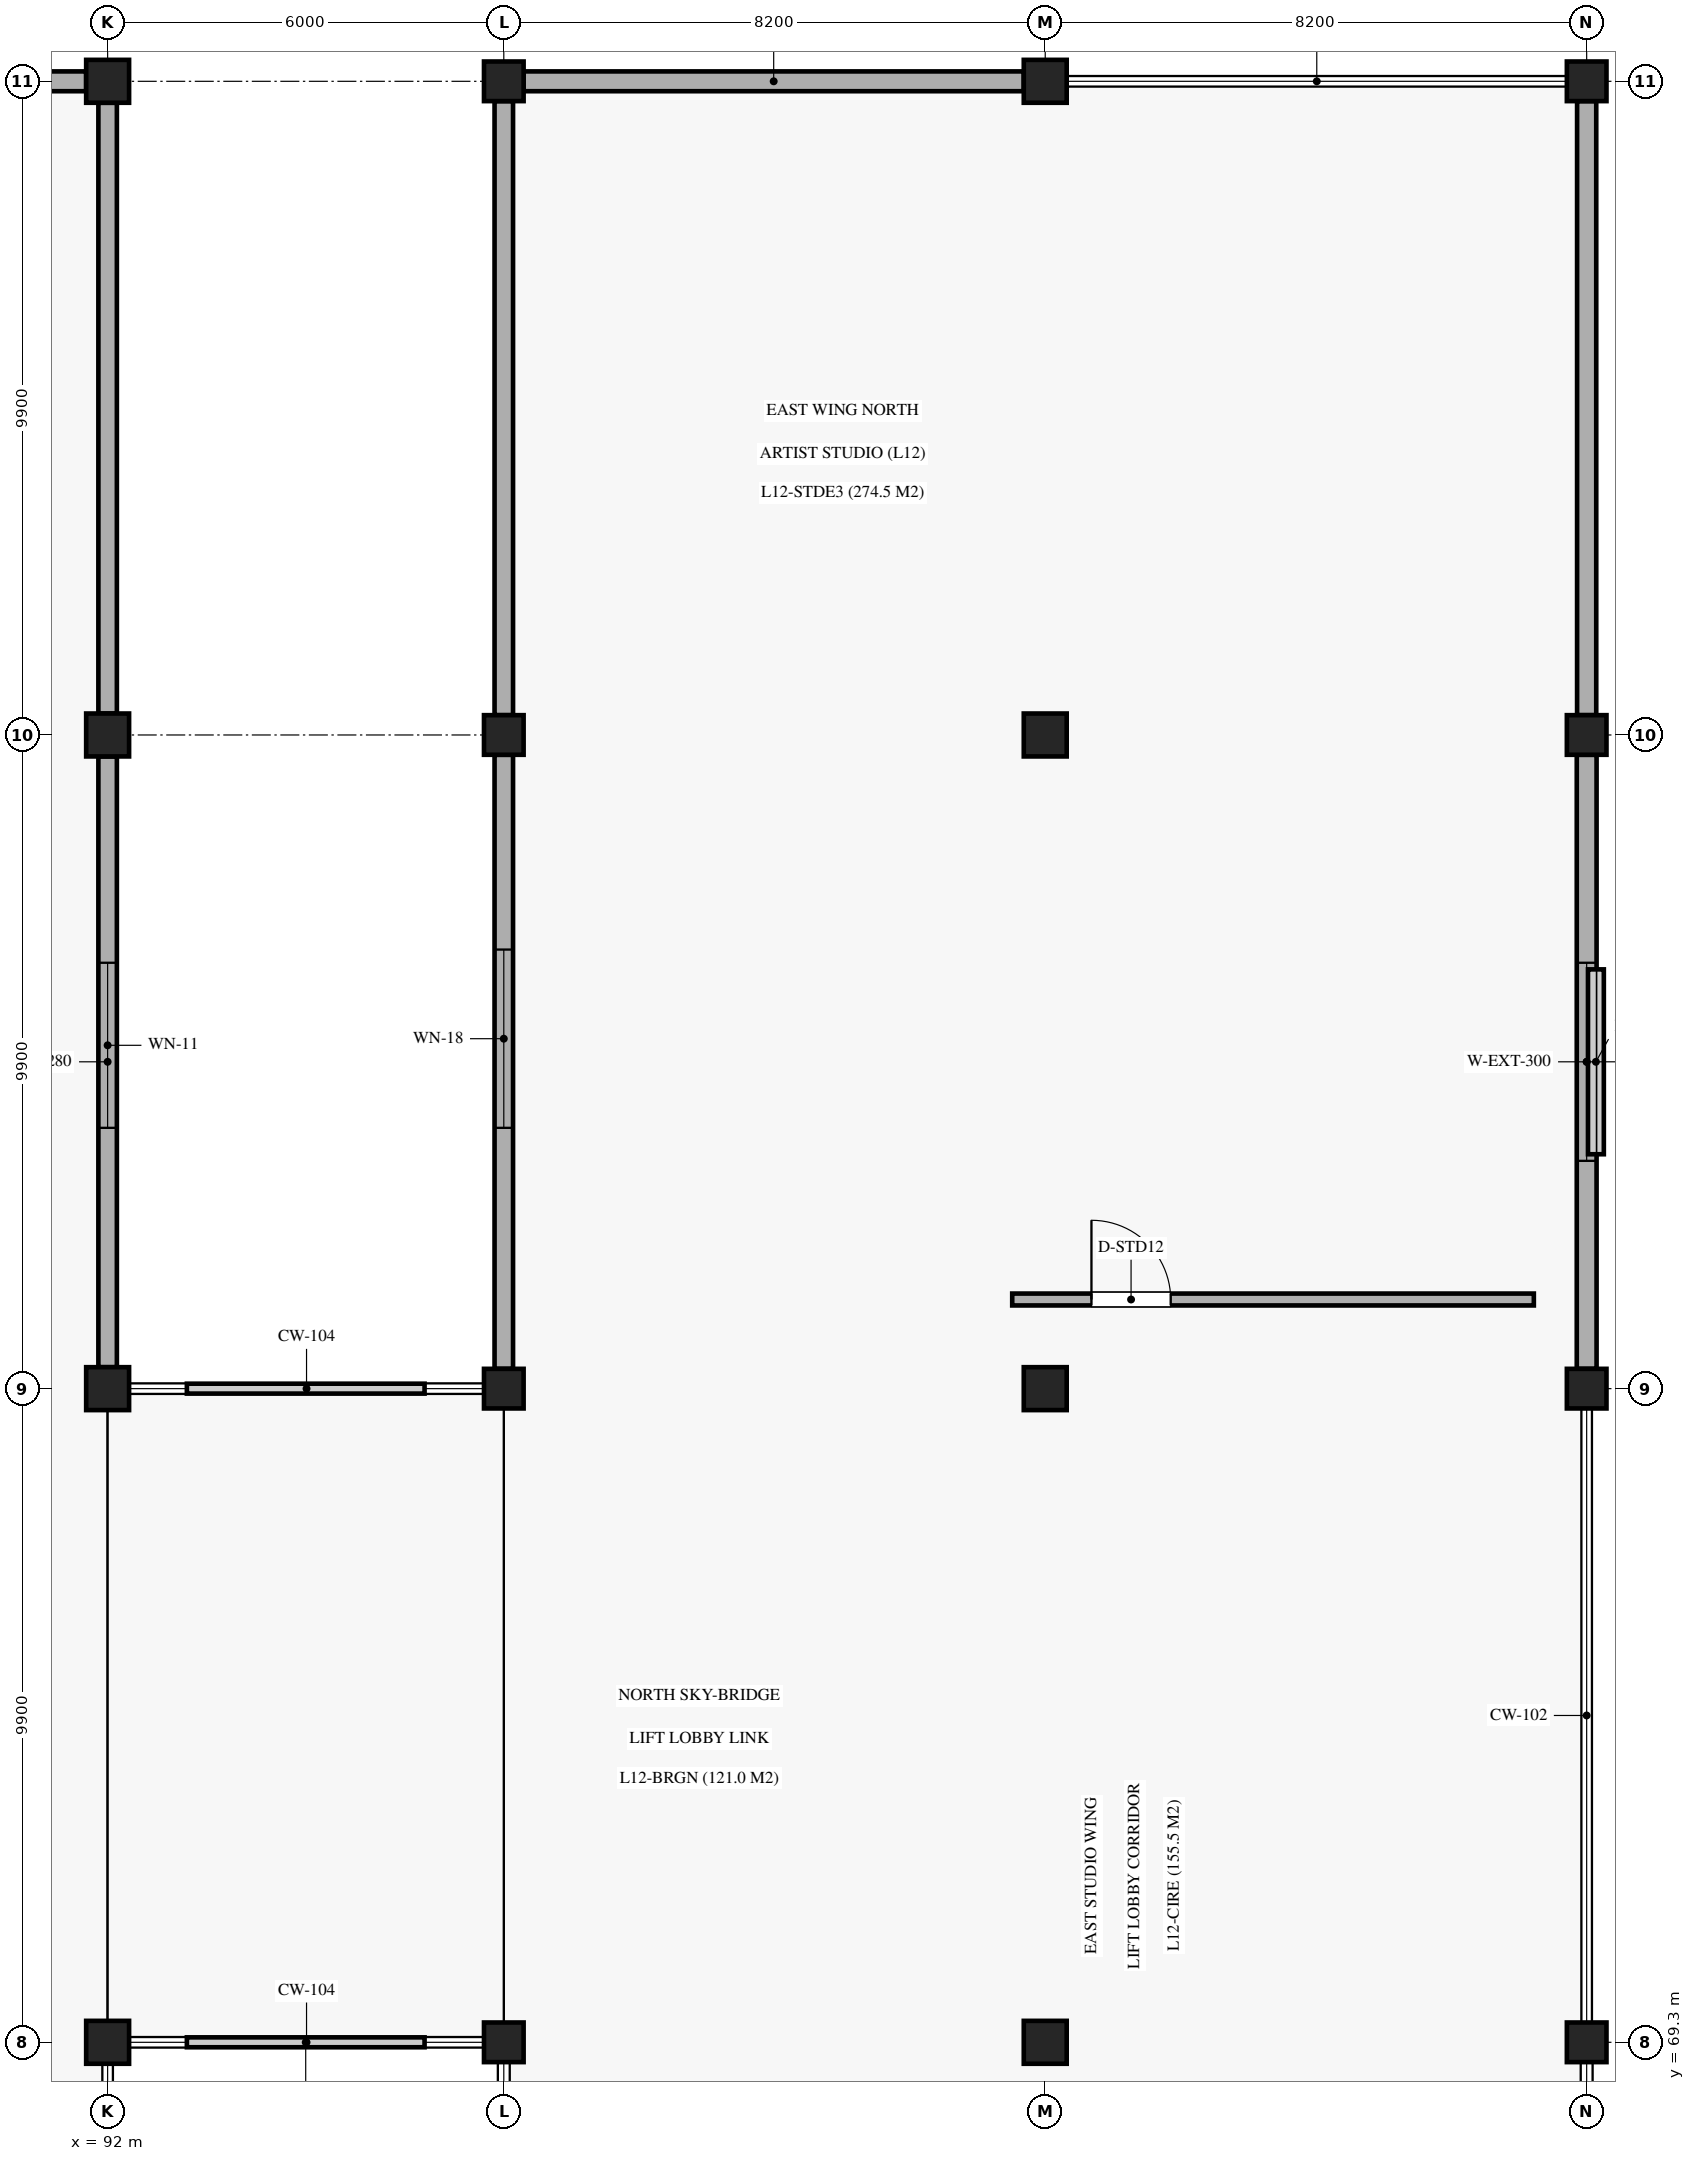
"""IFC4 building model, lengths in metres.
Left out: names, types, materials, properties, quantities, classifications, styles, units other than length and angle.
Written with IfcOpenShell. Run it as: python <this file> out.ifc"""

import sys

from ifc_helpers import new_model, si_unit, direction, frame, frame_2d, origin, origin_2d, place, context, subcontext, project, spatial, rectangle, extrude, element, fill, save


model = new_model("IFC4")
c1 = context("Model", 3, precision=1e-05, world=origin(), true_north=direction((0.0, 1.0)))
c2 = subcontext(c1, "Body", "Model", "MODEL_VIEW")
j1 = project(units=[si_unit("LENGTHUNIT", "METRE"), si_unit("PLANEANGLEUNIT", "RADIAN")], contexts=[c1])
p1 = place(None, origin())
s1 = spatial("IfcSite", under=j1, at=p1, CompositionType="ELEMENT")
p2 = place(p1, origin())
s2 = spatial("IfcBuilding", under=s1, at=p2, CompositionType="ELEMENT")
p3 = place(p2, frame((0.0, 0.0, 62.22)))
s3 = spatial("IfcBuildingStorey", under=s2, at=p3, CompositionType="ELEMENT", Elevation=62.22)
for number, where, z_axis, x_axis in (
    (1, (92.0, 69.3, 0.0), (0.0, 0.0, 1.0), (1.0, 0.0, 0.0)),
    (2, (92.0, 79.2, 0.0), (0.0, 0.0, 1.0), (1.0, 0.0, 0.0)),
    (3, (92.0, 89.1, 0.0), (0.0, 0.0, 1.0), (1.0, 0.0, 0.0)),
    (4, (92.0, 99.0, 0.0), (0.0, 0.0, 1.0), (1.0, 0.0, 0.0)),
):
    element("IfcColumn", number, at=place(p3, frame(where, z_axis=z_axis, x_axis=x_axis)), inside=s3, PredefinedType="COLUMN", context=c2, shape_type="SweptSolid", body=[
        extrude(rectangle(XDim=0.65, YDim=0.65, at=origin_2d()), origin(), (0.0, 0.0, 1.0), 4.08),
    ])
for number, where, z_axis, x_axis in (
    (5, (98.0, 69.3, 0.0), (0.0, 0.0, 1.0), (1.0, 0.0, 0.0)),
    (6, (98.0, 79.2, 0.0), (0.0, 0.0, 1.0), (1.0, 0.0, 0.0)),
    (7, (98.0, 89.1, 0.0), (0.0, 0.0, 1.0), (1.0, 0.0, 0.0)),
    (8, (98.0, 99.0, 0.0), (0.0, 0.0, 1.0), (1.0, 0.0, 0.0)),
):
    element("IfcColumn", number, at=place(p3, frame(where, z_axis=z_axis, x_axis=x_axis)), inside=s3, PredefinedType="COLUMN", context=c2, shape_type="SweptSolid", body=[
        extrude(rectangle(XDim=0.6, YDim=0.6, at=origin_2d()), origin(), (0.0, 0.0, 1.0), 4.08),
    ])
for number, where, z_axis, x_axis in (
    (9, (106.2, 69.3, 0.0), (0.0, 0.0, 1.0), (1.0, 0.0, 0.0)),
    (10, (106.2, 79.2, 0.0), (0.0, 0.0, 1.0), (1.0, 0.0, 0.0)),
    (11, (106.2, 89.1, 0.0), (0.0, 0.0, 1.0), (1.0, 0.0, 0.0)),
    (12, (106.2, 99.0, 0.0), (0.0, 0.0, 1.0), (1.0, 0.0, 0.0)),
):
    element("IfcColumn", number, at=place(p3, frame(where, z_axis=z_axis, x_axis=x_axis)), inside=s3, PredefinedType="COLUMN", context=c2, shape_type="SweptSolid", body=[
        extrude(rectangle(XDim=0.65, YDim=0.65, at=origin_2d()), origin(), (0.0, 0.0, 1.0), 4.08),
    ])
for number, where, z_axis, x_axis in (
    (13, (114.4, 69.3, 0.0), (0.0, 0.0, 1.0), (1.0, 0.0, 0.0)),
    (14, (114.4, 79.2, 0.0), (0.0, 0.0, 1.0), (1.0, 0.0, 0.0)),
    (15, (114.4, 89.1, 0.0), (0.0, 0.0, 1.0), (1.0, 0.0, 0.0)),
    (16, (114.4, 99.0, 0.0), (0.0, 0.0, 1.0), (1.0, 0.0, 0.0)),
):
    element("IfcColumn", number, at=place(p3, frame(where, z_axis=z_axis, x_axis=x_axis)), inside=s3, PredefinedType="COLUMN", context=c2, shape_type="SweptSolid", body=[
        extrude(rectangle(XDim=0.6, YDim=0.6, at=origin_2d()), origin(), (0.0, 0.0, 1.0), 4.08),
    ])
p4 = place(p3, frame((92.0, 79.525, 0.0), z_axis=(0.0, 0.0, 1.0), x_axis=(0.0, 1.0, 0.0)))
e17 = element("IfcWall", 17, at=p4, inside=s3, PredefinedType="SOLIDWALL", context=c2, shape_type="SweptSolid", body=[
    extrude(rectangle(XDim=9.25, YDim=0.28, at=frame_2d((4.625, 0.0))), origin(), (0.0, 0.0, 1.0), 3.1),
])
p5 = place(p4, frame((3.625, 0.0, 1.15)))
e18 = element("IfcOpeningElement", 18, at=p5, cuts=e17, PredefinedType="OPENING", context=c2, shape_type="SweptSolid", body=[
    extrude(rectangle(XDim=2.5, YDim=1.6, at=frame_2d((1.25, 0.8))), frame((0.0, 0.15, 0.0), z_axis=(0.0, -1.0, 0.0), x_axis=(1.0, 0.0, 0.0)), (0.0, 0.0, 1.0), 0.3),
])
p6 = place(p3, frame((92.0, 89.425, 0.0), z_axis=(0.0, 0.0, 1.0), x_axis=(0.0, 1.0, 0.0)))
e19 = element("IfcWall", 19, at=p6, inside=s3, PredefinedType="SOLIDWALL", context=c2, shape_type="SweptSolid", body=[
    extrude(rectangle(XDim=9.25, YDim=0.28, at=frame_2d((4.625, 0.0))), origin(), (0.0, 0.0, 1.0), 3.1),
])
p7 = place(p3, frame((84.325, 99.0, 0.0), z_axis=(0.0, 0.0, 1.0), x_axis=(1.0, 0.0, 0.0)))
e20 = element("IfcWall", 20, at=p7, inside=s3, PredefinedType="SOLIDWALL", context=c2, shape_type="SweptSolid", body=[
    extrude(rectangle(XDim=7.35, YDim=0.3, at=frame_2d((3.675, 0.0))), origin(), (0.0, 0.0, 1.0), 3.1),
])
p8 = place(p3, frame((98.0, 79.5, 0.0), z_axis=(0.0, 0.0, 1.0), x_axis=(0.0, 1.0, 0.0)))
e21 = element("IfcWall", 21, at=p8, inside=s3, PredefinedType="SOLIDWALL", context=c2, shape_type="SweptSolid", body=[
    extrude(rectangle(XDim=9.3, YDim=0.28, at=frame_2d((4.65, 0.0))), origin(), (0.0, 0.0, 1.0), 3.1),
])
p9 = place(p8, frame((3.65, 0.0, 1.15)))
e22 = element("IfcOpeningElement", 22, at=p9, cuts=e21, PredefinedType="OPENING", context=c2, shape_type="SweptSolid", body=[
    extrude(rectangle(XDim=2.7, YDim=1.5, at=frame_2d((1.35, 0.75))), frame((0.0, 0.15, 0.0), z_axis=(0.0, -1.0, 0.0), x_axis=(1.0, 0.0, 0.0)), (0.0, 0.0, 1.0), 0.3),
])
p10 = place(p3, frame((114.4, 79.5, 0.0), z_axis=(0.0, 0.0, 1.0), x_axis=(0.0, 1.0, 0.0)))
e23 = element("IfcWall", 23, at=p10, inside=s3, PredefinedType="SOLIDWALL", context=c2, shape_type="SweptSolid", body=[
    extrude(rectangle(XDim=9.3, YDim=0.3, at=frame_2d((4.65, 0.0))), origin(), (0.0, 0.0, 1.0), 3.1),
])
p11 = place(p10, frame((3.15, 0.0, 1.15)))
e24 = element("IfcOpeningElement", 24, at=p11, cuts=e23, PredefinedType="OPENING", context=c2, shape_type="SweptSolid", body=[
    extrude(rectangle(XDim=3.0, YDim=1.95, at=frame_2d((1.5, 0.975))), frame((0.0, 0.16, 0.0), z_axis=(0.0, -1.0, 0.0), x_axis=(1.0, 0.0, 0.0)), (0.0, 0.0, 1.0), 0.32),
])
p12 = place(p3, frame((98.0, 89.4, 0.0), z_axis=(0.0, 0.0, 1.0), x_axis=(0.0, 1.0, 0.0)))
e25 = element("IfcWall", 25, at=p12, inside=s3, PredefinedType="SOLIDWALL", context=c2, shape_type="SweptSolid", body=[
    extrude(rectangle(XDim=9.3, YDim=0.28, at=frame_2d((4.65, 0.0))), origin(), (0.0, 0.0, 1.0), 3.1),
])
p13 = place(p3, frame((114.4, 89.4, 0.0), z_axis=(0.0, 0.0, 1.0), x_axis=(0.0, 1.0, 0.0)))
e26 = element("IfcWall", 26, at=p13, inside=s3, PredefinedType="SOLIDWALL", context=c2, shape_type="SweptSolid", body=[
    extrude(rectangle(XDim=9.3, YDim=0.29, at=frame_2d((4.65, 0.0))), origin(), (0.0, 0.0, 1.0), 3.1),
])
p14 = place(p3, frame((98.3, 99.0, 0.0), z_axis=(0.0, 0.0, 1.0), x_axis=(1.0, 0.0, 0.0)))
e27 = element("IfcWall", 27, at=p14, inside=s3, PredefinedType="SOLIDWALL", context=c2, shape_type="SweptSolid", body=[
    extrude(rectangle(XDim=7.575, YDim=0.3, at=frame_2d((3.788, 0.0))), origin(), (0.0, 0.0, 1.0), 3.1),
])
p15 = place(p3, frame((105.7, 80.55, 0.0), z_axis=(0.0, 0.0, 1.0), x_axis=(1.0, 0.0, 0.0)))
e28 = element("IfcWall", 28, at=p15, inside=s3, PredefinedType="PARTITIONING", context=c2, shape_type="SweptSolid", body=[
    extrude(rectangle(XDim=7.9, YDim=0.18, at=frame_2d((3.95, 0.0))), origin(), (0.0, 0.0, 1.0), 2.97),
])
p16 = place(p15, frame((1.2, 0.0, 0.0)))
e29 = element("IfcOpeningElement", 29, at=p16, cuts=e28, PredefinedType="OPENING", context=c2, shape_type="SweptSolid", body=[
    extrude(rectangle(XDim=1.2, YDim=2.25, at=frame_2d((0.6, 1.125))), frame((0.0, 0.1, 0.0), z_axis=(0.0, -1.0, 0.0), x_axis=(1.0, 0.0, 0.0)), (0.0, 0.0, 1.0), 0.2),
])
p17 = place(p5, origin())
e30 = element("IfcWindow", 30, at=p17, inside=s3, PartitioningType="SINGLE_PANEL", PredefinedType="WINDOW", context=c2, shape_type="SweptSolid", body=[
    extrude(rectangle(XDim=2.5, YDim=1.6, at=frame_2d((1.25, 0.8))), frame((0.0, 0.03, 0.0), z_axis=(0.0, -1.0, 0.0), x_axis=(1.0, 0.0, 0.0)), (0.0, 0.0, 1.0), 0.06),
])
fill(e18, e30)
p18 = place(p9, origin())
e31 = element("IfcWindow", 31, at=p18, inside=s3, PartitioningType="SINGLE_PANEL", PredefinedType="WINDOW", context=c2, shape_type="SweptSolid", body=[
    extrude(rectangle(XDim=2.7, YDim=1.5, at=frame_2d((1.35, 0.75))), frame((0.0, 0.03, 0.0), z_axis=(0.0, -1.0, 0.0), x_axis=(1.0, 0.0, 0.0)), (0.0, 0.0, 1.0), 0.06),
])
fill(e22, e31)
p19 = place(p11, origin())
e32 = element("IfcWindow", 32, at=p19, inside=s3, PartitioningType="SINGLE_PANEL", PredefinedType="WINDOW", context=c2, shape_type="SweptSolid", body=[
    extrude(rectangle(XDim=3.0, YDim=1.95, at=frame_2d((1.5, 0.975))), frame((0.0, 0.03, 0.0), z_axis=(0.0, -1.0, 0.0), x_axis=(1.0, 0.0, 0.0)), (0.0, 0.0, 1.0), 0.06),
])
fill(e24, e32)
p20 = place(p16, origin())
e33 = element("IfcDoor", 33, at=p20, inside=s3, OperationType="SINGLE_SWING_LEFT", PredefinedType="DOOR", context=c2, shape_type="SweptSolid", body=[
    extrude(rectangle(XDim=1.2, YDim=2.25, at=frame_2d((0.6, 1.125))), frame((0.0, 0.025, 0.0), z_axis=(0.0, -1.0, 0.0), x_axis=(1.0, 0.0, 0.0)), (0.0, 0.0, 1.0), 0.05),
])
fill(e29, e33)
save(model, sys.argv[1])
